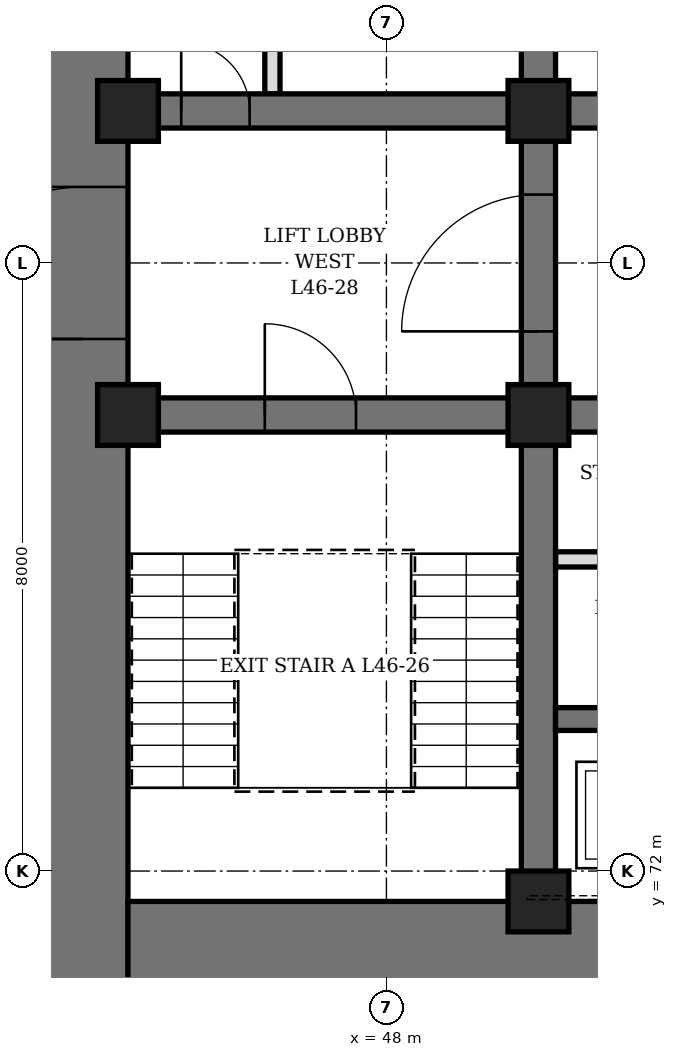
"""IFC4 building model, lengths in metres.
Left out: names, types, materials, properties, quantities, classifications, styles, units other than length and angle.
Written with IfcOpenShell. Run it as: python <this file> out.ifc"""

import sys

from ifc_helpers import new_model, si_unit, direction, frame, frame_2d, origin, origin_2d, place, context, subcontext, project, spatial, rectangle, hollow_rectangle, extrude, element, fill, save


model = new_model("IFC4")
c1 = context("Model", 3, precision=1e-05, world=origin(), true_north=direction((0.0, 1.0)))
c2 = subcontext(c1, "Body", "Model", "MODEL_VIEW")
j1 = project(units=[si_unit("LENGTHUNIT", "METRE"), si_unit("PLANEANGLEUNIT", "RADIAN")], contexts=[c1])
p1 = place(None, origin())
s1 = spatial("IfcSite", under=j1, at=p1, CompositionType="ELEMENT")
p2 = place(p1, origin())
s2 = spatial("IfcBuilding", under=s1, at=p2, CompositionType="ELEMENT")
p3 = place(p2, frame((0.0, 0.0, 206.5)))
s3 = spatial("IfcBuildingStorey", under=s2, at=p3, CompositionType="ELEMENT", Elevation=206.5)
p4 = place(p3, frame((44.0, 70.4, 0.0), z_axis=(0.0, 0.0, 1.0), x_axis=(0.0, 1.0, 0.0)))
e1 = element("IfcWall", 1, at=p4, inside=s3, PredefinedType="SHEAR", context=c2, shape_type="SweptSolid", body=[
    extrude(rectangle(XDim=19.2, YDim=1.2, at=frame_2d((9.6, 0.0))), origin(), (0.0, 0.0, 1.0), 4.2),
])
p5 = place(p4, frame((8.6, 0.0, 0.0)))
e2 = element("IfcOpeningElement", 2, at=p5, cuts=e1, PredefinedType="OPENING", context=c2, shape_type="SweptSolid", body=[
    extrude(rectangle(XDim=2.0, YDim=2.4, at=frame_2d((1.0, 1.2))), frame((0.0, 0.61, 0.0), z_axis=(0.0, -1.0, 0.0), x_axis=(1.0, 0.0, 0.0)), (0.0, 0.0, 1.0), 1.22),
])
p6 = place(p3, frame((44.6, 71.0, 0.0), z_axis=(0.0, 0.0, 1.0), x_axis=(1.0, 0.0, 0.0)))
e3 = element("IfcWall", 3, at=p6, inside=s3, PredefinedType="SHEAR", context=c2, shape_type="SweptSolid", body=[
    extrude(rectangle(XDim=22.8, YDim=1.2, at=frame_2d((11.4, 0.0))), origin(), (0.0, 0.0, 1.0), 4.2),
])
p7 = place(p6, frame((6.35, 0.0, 0.0)))
e4 = element("IfcOpeningElement", 4, at=p7, cuts=e3, PredefinedType="OPENING", context=c2, shape_type="SweptSolid", body=[
    extrude(rectangle(XDim=1.1, YDim=2.2, at=frame_2d((0.55, 1.1))), frame((0.0, 0.61, 0.0), z_axis=(0.0, -1.0, 0.0), x_axis=(1.0, 0.0, 0.0)), (0.0, 0.0, 1.0), 1.22),
])
p8 = place(p6, frame((9.35, 0.0, 0.0)))
e5 = element("IfcOpeningElement", 5, at=p8, cuts=e3, PredefinedType="OPENING", context=c2, shape_type="SweptSolid", body=[
    extrude(rectangle(XDim=1.1, YDim=2.2, at=frame_2d((0.55, 1.1))), frame((0.0, 0.61, 0.0), z_axis=(0.0, -1.0, 0.0), x_axis=(1.0, 0.0, 0.0)), (0.0, 0.0, 1.0), 1.22),
])
p9 = place(p6, frame((12.35, 0.0, 0.0)))
e6 = element("IfcOpeningElement", 6, at=p9, cuts=e3, PredefinedType="OPENING", context=c2, shape_type="SweptSolid", body=[
    extrude(rectangle(XDim=1.1, YDim=2.2, at=frame_2d((0.55, 1.1))), frame((0.0, 0.61, 0.0), z_axis=(0.0, -1.0, 0.0), x_axis=(1.0, 0.0, 0.0)), (0.0, 0.0, 1.0), 1.22),
])
p10 = place(p6, frame((15.35, 0.0, 0.0)))
e7 = element("IfcOpeningElement", 7, at=p10, cuts=e3, PredefinedType="OPENING", context=c2, shape_type="SweptSolid", body=[
    extrude(rectangle(XDim=1.1, YDim=2.2, at=frame_2d((0.55, 1.1))), frame((0.0, 0.61, 0.0), z_axis=(0.0, -1.0, 0.0), x_axis=(1.0, 0.0, 0.0)), (0.0, 0.0, 1.0), 1.22),
])
p11 = place(p3, frame((50.0, 71.6, 0.0), z_axis=(0.0, 0.0, 1.0), x_axis=(0.0, 1.0, 0.0)))
e8 = element("IfcWall", 8, at=p11, inside=s3, PredefinedType="SHEAR", context=c2, shape_type="SweptSolid", body=[
    extrude(rectangle(XDim=16.8, YDim=0.45, at=frame_2d((8.4, 0.0))), origin(), (0.0, 0.0, 1.0), 4.2),
])
p12 = place(p11, frame((7.5, 0.0, 0.0)))
e9 = element("IfcOpeningElement", 9, at=p12, cuts=e8, PredefinedType="OPENING", context=c2, shape_type="SweptSolid", body=[
    extrude(rectangle(XDim=1.8, YDim=2.4, at=frame_2d((0.9, 1.2))), frame((0.0, 0.235, 0.0), z_axis=(0.0, -1.0, 0.0), x_axis=(1.0, 0.0, 0.0)), (0.0, 0.0, 1.0), 0.47),
])
p13 = place(p3, frame((44.6, 78.0, 0.0), z_axis=(0.0, 0.0, 1.0), x_axis=(1.0, 0.0, 0.0)))
e10 = element("IfcWall", 10, at=p13, inside=s3, PredefinedType="SHEAR", context=c2, shape_type="SweptSolid", body=[
    extrude(rectangle(XDim=5.175, YDim=0.45, at=frame_2d((2.587, 0.0))), origin(), (0.0, 0.0, 1.0), 4.2),
])
p14 = place(p13, frame((1.8, 0.0, 0.0)))
e11 = element("IfcOpeningElement", 11, at=p14, cuts=e10, PredefinedType="OPENING", context=c2, shape_type="SweptSolid", body=[
    extrude(rectangle(XDim=1.2, YDim=2.1, at=frame_2d((0.6, 1.05))), frame((0.0, 0.235, 0.0), z_axis=(0.0, -1.0, 0.0), x_axis=(1.0, 0.0, 0.0)), (0.0, 0.0, 1.0), 0.47),
])
p15 = place(p3, frame((44.6, 82.0, 0.0), z_axis=(0.0, 0.0, 1.0), x_axis=(1.0, 0.0, 0.0)))
e12 = element("IfcWall", 12, at=p15, inside=s3, PredefinedType="SHEAR", context=c2, shape_type="SweptSolid", body=[
    extrude(rectangle(XDim=5.175, YDim=0.45, at=frame_2d((2.587, 0.0))), origin(), (0.0, 0.0, 1.0), 4.2),
])
p16 = place(p15, frame((0.7, 0.0, 0.0)))
e13 = element("IfcOpeningElement", 13, at=p16, cuts=e12, PredefinedType="OPENING", context=c2, shape_type="SweptSolid", body=[
    extrude(rectangle(XDim=0.9, YDim=2.1, at=frame_2d((0.45, 1.05))), frame((0.0, 0.235, 0.0), z_axis=(0.0, -1.0, 0.0), x_axis=(1.0, 0.0, 0.0)), (0.0, 0.0, 1.0), 0.47),
])
p17 = place(p3, frame((50.225, 78.0, 0.0), z_axis=(0.0, 0.0, 1.0), x_axis=(1.0, 0.0, 0.0)))
e14 = element("IfcWall", 14, at=p17, inside=s3, PredefinedType="SHEAR", context=c2, shape_type="SweptSolid", body=[
    extrude(rectangle(XDim=11.55, YDim=0.45, at=frame_2d((5.775, 0.0))), origin(), (0.0, 0.0, 1.0), 4.2),
])
p18 = place(p17, frame((0.825, 0.0, 0.0)))
e15 = element("IfcOpeningElement", 15, at=p18, cuts=e14, PredefinedType="OPENING", context=c2, shape_type="SweptSolid", body=[
    extrude(rectangle(XDim=0.9, YDim=2.1, at=frame_2d((0.45, 1.05))), frame((0.0, 0.235, 0.0), z_axis=(0.0, -1.0, 0.0), x_axis=(1.0, 0.0, 0.0)), (0.0, 0.0, 1.0), 0.47),
])
p19 = place(p17, frame((3.825, 0.0, 0.0)))
e16 = element("IfcOpeningElement", 16, at=p19, cuts=e14, PredefinedType="OPENING", context=c2, shape_type="SweptSolid", body=[
    extrude(rectangle(XDim=0.9, YDim=2.1, at=frame_2d((0.45, 1.05))), frame((0.0, 0.235, 0.0), z_axis=(0.0, -1.0, 0.0), x_axis=(1.0, 0.0, 0.0)), (0.0, 0.0, 1.0), 0.47),
])
p20 = place(p17, frame((6.825, 0.0, 0.0)))
e17 = element("IfcOpeningElement", 17, at=p20, cuts=e14, PredefinedType="OPENING", context=c2, shape_type="SweptSolid", body=[
    extrude(rectangle(XDim=0.9, YDim=2.1, at=frame_2d((0.45, 1.05))), frame((0.0, 0.235, 0.0), z_axis=(0.0, -1.0, 0.0), x_axis=(1.0, 0.0, 0.0)), (0.0, 0.0, 1.0), 0.47),
])
p21 = place(p17, frame((9.825, 0.0, 0.0)))
e18 = element("IfcOpeningElement", 18, at=p21, cuts=e14, PredefinedType="OPENING", context=c2, shape_type="SweptSolid", body=[
    extrude(rectangle(XDim=0.9, YDim=2.1, at=frame_2d((0.45, 1.05))), frame((0.0, 0.235, 0.0), z_axis=(0.0, -1.0, 0.0), x_axis=(1.0, 0.0, 0.0)), (0.0, 0.0, 1.0), 0.47),
])
p22 = place(p3, frame((50.225, 82.0, 0.0), z_axis=(0.0, 0.0, 1.0), x_axis=(1.0, 0.0, 0.0)))
e19 = element("IfcWall", 19, at=p22, inside=s3, PredefinedType="SHEAR", context=c2, shape_type="SweptSolid", body=[
    extrude(rectangle(XDim=11.55, YDim=0.45, at=frame_2d((5.775, 0.0))), origin(), (0.0, 0.0, 1.0), 4.2),
])
p23 = place(p22, frame((0.825, 0.0, 0.0)))
e20 = element("IfcOpeningElement", 20, at=p23, cuts=e19, PredefinedType="OPENING", context=c2, shape_type="SweptSolid", body=[
    extrude(rectangle(XDim=0.9, YDim=2.1, at=frame_2d((0.45, 1.05))), frame((0.0, 0.235, 0.0), z_axis=(0.0, -1.0, 0.0), x_axis=(1.0, 0.0, 0.0)), (0.0, 0.0, 1.0), 0.47),
])
p24 = place(p22, frame((3.825, 0.0, 0.0)))
e21 = element("IfcOpeningElement", 21, at=p24, cuts=e19, PredefinedType="OPENING", context=c2, shape_type="SweptSolid", body=[
    extrude(rectangle(XDim=0.9, YDim=2.1, at=frame_2d((0.45, 1.05))), frame((0.0, 0.235, 0.0), z_axis=(0.0, -1.0, 0.0), x_axis=(1.0, 0.0, 0.0)), (0.0, 0.0, 1.0), 0.47),
])
p25 = place(p22, frame((6.825, 0.0, 0.0)))
e22 = element("IfcOpeningElement", 22, at=p25, cuts=e19, PredefinedType="OPENING", context=c2, shape_type="SweptSolid", body=[
    extrude(rectangle(XDim=0.9, YDim=2.1, at=frame_2d((0.45, 1.05))), frame((0.0, 0.235, 0.0), z_axis=(0.0, -1.0, 0.0), x_axis=(1.0, 0.0, 0.0)), (0.0, 0.0, 1.0), 0.47),
])
p26 = place(p22, frame((9.825, 0.0, 0.0)))
e23 = element("IfcOpeningElement", 23, at=p26, cuts=e19, PredefinedType="OPENING", context=c2, shape_type="SweptSolid", body=[
    extrude(rectangle(XDim=0.9, YDim=2.1, at=frame_2d((0.45, 1.05))), frame((0.0, 0.235, 0.0), z_axis=(0.0, -1.0, 0.0), x_axis=(1.0, 0.0, 0.0)), (0.0, 0.0, 1.0), 0.47),
])
p27 = place(p3, frame((50.225, 74.0, 0.0), z_axis=(0.0, 0.0, 1.0), x_axis=(1.0, 0.0, 0.0)))
e24 = element("IfcWall", 24, at=p27, inside=s3, PredefinedType="SHEAR", context=c2, shape_type="SweptSolid", body=[
    extrude(rectangle(XDim=11.55, YDim=0.3, at=frame_2d((5.775, 0.0))), origin(), (0.0, 0.0, 1.0), 4.2),
])
for number, where, z_axis, x_axis in (
    (25, (44.6, 78.0, 0.0), (0.0, 0.0, 1.0), (1.0, 0.0, 0.0)),
    (26, (44.6, 82.0, 0.0), (0.0, 0.0, 1.0), (1.0, 0.0, 0.0)),
    (27, (50.0, 71.6, 0.0), (0.0, 0.0, 1.0), (1.0, 0.0, 0.0)),
    (28, (50.0, 78.0, 0.0), (0.0, 0.0, 1.0), (1.0, 0.0, 0.0)),
    (29, (50.0, 82.0, 0.0), (0.0, 0.0, 1.0), (1.0, 0.0, 0.0)),
):
    element("IfcColumn", number, at=place(p3, frame(where, z_axis=z_axis, x_axis=x_axis)), inside=s3, PredefinedType="COLUMN", context=c2, shape_type="SweptSolid", body=[
        extrude(hollow_rectangle(XDim=0.8, YDim=0.8, WallThickness=0.1, at=origin_2d()), origin(), (0.0, 0.0, 1.0), 4.2),
    ])
p28 = place(p3, frame((46.5, 82.225, 0.0), z_axis=(0.0, 0.0, 1.0), x_axis=(0.0, 1.0, 0.0)))
e30 = element("IfcWall", 30, at=p28, inside=s3, PredefinedType="PARTITIONING", context=c2, shape_type="SweptSolid", body=[
    extrude(rectangle(XDim=3.05, YDim=0.2, at=frame_2d((1.525, 0.0))), origin(), (0.0, 0.0, 1.0), 4.04),
])
p29 = place(p28, frame((1.075, 0.0, 0.0)))
e31 = element("IfcOpeningElement", 31, at=p29, cuts=e30, PredefinedType="OPENING", context=c2, shape_type="SweptSolid", body=[
    extrude(rectangle(XDim=0.9, YDim=2.1, at=frame_2d((0.45, 1.05))), frame((0.0, 0.11, 0.0), z_axis=(0.0, -1.0, 0.0), x_axis=(1.0, 0.0, 0.0)), (0.0, 0.0, 1.0), 0.22),
])
p30 = place(p3, frame((50.225, 76.1, 0.0), z_axis=(0.0, 0.0, 1.0), x_axis=(1.0, 0.0, 0.0)))
e32 = element("IfcWall", 32, at=p30, inside=s3, PredefinedType="PARTITIONING", context=c2, shape_type="SweptSolid", body=[
    extrude(rectangle(XDim=2.55, YDim=0.2, at=frame_2d((1.275, 0.0))), origin(), (0.0, 0.0, 1.0), 4.04),
])
p31 = place(p30, frame((0.825, 0.0, 0.0)))
e33 = element("IfcOpeningElement", 33, at=p31, cuts=e32, PredefinedType="OPENING", context=c2, shape_type="SweptSolid", body=[
    extrude(rectangle(XDim=0.9, YDim=2.1, at=frame_2d((0.45, 1.05))), frame((0.0, 0.11, 0.0), z_axis=(0.0, -1.0, 0.0), x_axis=(1.0, 0.0, 0.0)), (0.0, 0.0, 1.0), 0.22),
])
p32 = place(p16, origin())
e34 = element("IfcDoor", 34, at=p32, inside=s3, OperationType="SINGLE_SWING_LEFT", PredefinedType="DOOR", context=c2, shape_type="SweptSolid", body=[
    extrude(rectangle(XDim=0.9, YDim=2.1, at=frame_2d((0.45, 1.05))), frame((0.0, 0.225, 0.0), z_axis=(0.0, -1.0, 0.0), x_axis=(1.0, 0.0, 0.0)), (0.0, 0.0, 1.0), 0.449),
])
fill(e13, e34)
p33 = place(p14, origin())
e35 = element("IfcDoor", 35, at=p33, inside=s3, OperationType="SINGLE_SWING_LEFT", PredefinedType="DOOR", context=c2, shape_type="SweptSolid", body=[
    extrude(rectangle(XDim=1.2, YDim=2.1, at=frame_2d((0.6, 1.05))), frame((0.0, 0.225, 0.0), z_axis=(0.0, -1.0, 0.0), x_axis=(1.0, 0.0, 0.0)), (0.0, 0.0, 1.0), 0.449),
])
fill(e11, e35)
p34 = place(p5, origin())
e36 = element("IfcDoor", 36, at=p34, inside=s3, OperationType="DOUBLE_DOOR_SINGLE_SWING", PredefinedType="DOOR", context=c2, shape_type="SweptSolid", body=[
    extrude(rectangle(XDim=2.0, YDim=2.4, at=frame_2d((1.0, 1.2))), frame((0.0, 0.35, 0.0), z_axis=(0.0, -1.0, 0.0), x_axis=(1.0, 0.0, 0.0)), (0.0, 0.0, 1.0), 0.7),
])
fill(e2, e36)
p35 = place(p12, origin())
e37 = element("IfcDoor", 37, at=p35, inside=s3, OperationType="DOUBLE_DOOR_SINGLE_SWING", PredefinedType="DOOR", context=c2, shape_type="SweptSolid", body=[
    extrude(rectangle(XDim=1.8, YDim=2.4, at=frame_2d((0.9, 1.2))), frame((0.0, 0.225, 0.0), z_axis=(0.0, -1.0, 0.0), x_axis=(1.0, 0.0, 0.0)), (0.0, 0.0, 1.0), 0.449),
])
fill(e9, e37)
save(model, sys.argv[1])
